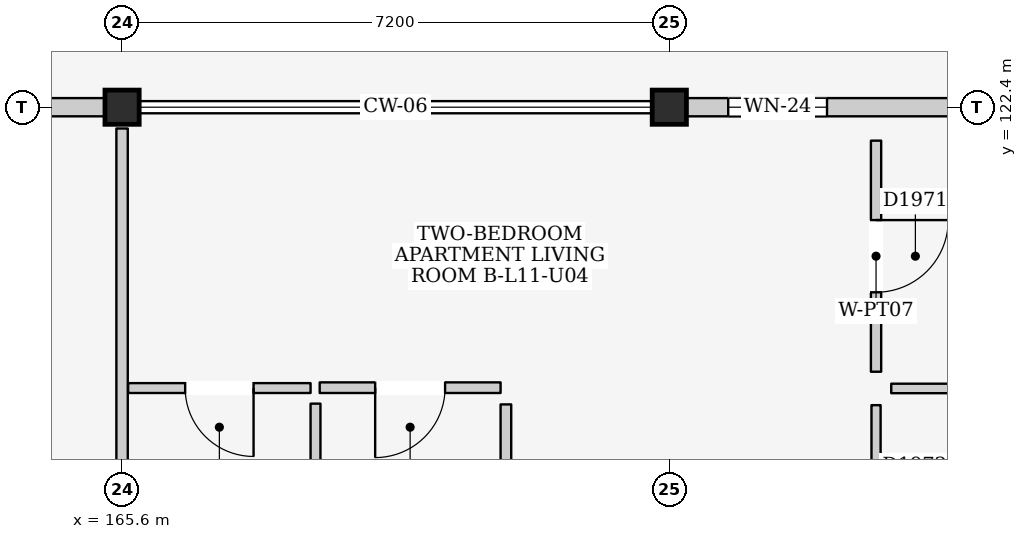
"""IFC4 building model, lengths in metres.
Left out: names, types, materials, properties, quantities, classifications, styles, units other than length and angle.
Written with IfcOpenShell. Run it as: python <this file> out.ifc"""

import sys

from ifc_helpers import new_model, si_unit, direction, frame, frame_2d, origin, origin_2d, place, context, subcontext, project, spatial, rectangle, extrude, element, fill, save


model = new_model("IFC4")
c1 = context("Model", 3, precision=1e-05, world=origin(), true_north=direction((0.0, 1.0)))
c2 = subcontext(c1, "Body", "Model", "MODEL_VIEW")
j1 = project(units=[si_unit("LENGTHUNIT", "METRE"), si_unit("PLANEANGLEUNIT", "RADIAN")], contexts=[c1])
p1 = place(None, origin())
s1 = spatial("IfcSite", under=j1, at=p1, CompositionType="ELEMENT")
p2 = place(p1, origin())
s2 = spatial("IfcBuilding", under=s1, at=p2, CompositionType="ELEMENT")
p3 = place(p2, frame((0.0, 0.0, 38.0)))
s3 = spatial("IfcBuildingStorey", under=s2, at=p3, CompositionType="ELEMENT", Elevation=38.0)
for number, where, z_axis, x_axis in (
    (1, (165.6, 122.4, 0.0), (0.0, 0.0, 1.0), (1.0, 0.0, 0.0)),
    (2, (172.8, 122.4, 0.0), (0.0, 0.0, 1.0), (1.0, 0.0, 0.0)),
):
    element("IfcColumn", number, at=place(p3, frame(where, z_axis=z_axis, x_axis=x_axis)), inside=s3, PredefinedType="COLUMN", context=c2, shape_type="SweptSolid", body=[
        extrude(rectangle(XDim=0.45, YDim=0.45, at=origin_2d()), origin(), (0.0, 0.0, 1.0), 3.2),
    ])
p4 = place(p3, frame((158.625, 122.4, 0.0), z_axis=(0.0, 0.0, 1.0), x_axis=(1.0, 0.0, 0.0)))
e3 = element("IfcWall", 3, at=p4, inside=s3, PredefinedType="ELEMENTEDWALL", context=c2, shape_type="SweptSolid", body=[
    extrude(rectangle(XDim=6.75, YDim=0.24, at=frame_2d((3.375, 0.0))), origin(), (0.0, 0.0, 1.0), 2.525),
])
p5 = place(p4, frame((3.85, 0.0, 0.0)))
e4 = element("IfcOpeningElement", 4, at=p5, cuts=e3, PredefinedType="OPENING", context=c2, shape_type="SweptSolid", body=[
    extrude(rectangle(XDim=2.0, YDim=2.12, at=frame_2d((1.0, 1.06))), frame((0.0, 0.135, 0.0), z_axis=(0.0, -1.0, 0.0), x_axis=(1.0, 0.0, 0.0)), (0.0, 0.0, 1.0), 0.27),
])
p6 = place(p4, frame((0.55, 0.0, 0.9)))
e5 = element("IfcOpeningElement", 5, at=p6, cuts=e3, PredefinedType="OPENING", context=c2, shape_type="SweptSolid", body=[
    extrude(rectangle(XDim=1.55, YDim=1.45, at=frame_2d((0.775, 0.725))), frame((0.0, 0.135, 0.0), z_axis=(0.0, -1.0, 0.0), x_axis=(1.0, 0.0, 0.0)), (0.0, 0.0, 1.0), 0.27),
])
p7 = place(p3, frame((173.025, 122.4, 0.0), z_axis=(0.0, 0.0, 1.0), x_axis=(1.0, 0.0, 0.0)))
e6 = element("IfcWall", 6, at=p7, inside=s3, PredefinedType="ELEMENTEDWALL", context=c2, shape_type="SweptSolid", body=[
    extrude(rectangle(XDim=6.75, YDim=0.24, at=frame_2d((3.375, 0.0))), origin(), (0.0, 0.0, 1.0), 2.525),
])
p8 = place(p7, frame((3.85, 0.0, 0.0)))
e7 = element("IfcOpeningElement", 7, at=p8, cuts=e6, PredefinedType="OPENING", context=c2, shape_type="SweptSolid", body=[
    extrude(rectangle(XDim=1.8, YDim=2.12, at=frame_2d((0.9, 1.06))), frame((0.0, 0.135, 0.0), z_axis=(0.0, -1.0, 0.0), x_axis=(1.0, 0.0, 0.0)), (0.0, 0.0, 1.0), 0.27),
])
p9 = place(p7, frame((0.55, 0.0, 0.9)))
e8 = element("IfcOpeningElement", 8, at=p9, cuts=e6, PredefinedType="OPENING", context=c2, shape_type="SweptSolid", body=[
    extrude(rectangle(XDim=1.3, YDim=1.25, at=frame_2d((0.65, 0.625))), frame((0.0, 0.135, 0.0), z_axis=(0.0, -1.0, 0.0), x_axis=(1.0, 0.0, 0.0)), (0.0, 0.0, 1.0), 0.27),
])
p10 = place(p3, frame((165.6, 115.48, 0.0), z_axis=(0.0, 0.0, 1.0), x_axis=(0.0, 1.0, 0.0)))
e9 = element("IfcWall", 9, at=p10, inside=s3, PredefinedType="PARTITIONING", context=c2, shape_type="SweptSolid", body=[
    extrude(rectangle(XDim=6.64, YDim=0.15, at=frame_2d((3.32, 0.0))), origin(), (0.0, 0.0, 1.0), 2.475),
])
p11 = place(p3, frame((165.68, 118.705, 0.0), z_axis=(0.0, 0.0, 1.0), x_axis=(1.0, 0.0, 0.0)))
e10 = element("IfcWall", 10, at=p11, inside=s3, PredefinedType="PARTITIONING", context=c2, shape_type="SweptSolid", body=[
    extrude(rectangle(XDim=2.4, YDim=0.13, at=frame_2d((1.2, 0.0))), origin(), (0.0, 0.0, 1.0), 2.99),
])
p12 = place(p11, frame((0.75, 0.0, 0.0)))
e11 = element("IfcOpeningElement", 11, at=p12, cuts=e10, PredefinedType="OPENING", context=c2, shape_type="SweptSolid", body=[
    extrude(rectangle(XDim=0.9, YDim=2.1, at=frame_2d((0.45, 1.05))), frame((0.0, 0.08, 0.0), z_axis=(0.0, -1.0, 0.0), x_axis=(1.0, 0.0, 0.0)), (0.0, 0.0, 1.0), 0.16),
])
p13 = place(p3, frame((168.145, 115.46, 0.0), z_axis=(0.0, 0.0, 1.0), x_axis=(0.0, 1.0, 0.0)))
e12 = element("IfcWall", 12, at=p13, inside=s3, PredefinedType="PARTITIONING", context=c2, shape_type="SweptSolid", body=[
    extrude(rectangle(XDim=3.04, YDim=0.13, at=frame_2d((1.52, 0.0))), origin(), (0.0, 0.0, 1.0), 2.99),
])
p14 = place(p3, frame((168.2, 118.71, 0.0), z_axis=(0.0, 0.0, 1.0), x_axis=(1.0, 0.0, 0.0)))
e13 = element("IfcWall", 13, at=p14, inside=s3, PredefinedType="PARTITIONING", context=c2, shape_type="SweptSolid", body=[
    extrude(rectangle(XDim=2.38, YDim=0.14, at=frame_2d((1.19, 0.0))), origin(), (0.0, 0.0, 1.0), 2.99),
])
p15 = place(p14, frame((0.73, 0.0, 0.0)))
e14 = element("IfcOpeningElement", 14, at=p15, cuts=e13, PredefinedType="OPENING", context=c2, shape_type="SweptSolid", body=[
    extrude(rectangle(XDim=0.92, YDim=2.1, at=frame_2d((0.46, 1.05))), frame((0.0, 0.085, 0.0), z_axis=(0.0, -1.0, 0.0), x_axis=(1.0, 0.0, 0.0)), (0.0, 0.0, 1.0), 0.17),
])
p16 = place(p3, frame((170.65, 115.43, 0.0), z_axis=(0.0, 0.0, 1.0), x_axis=(0.0, 1.0, 0.0)))
e15 = element("IfcWall", 15, at=p16, inside=s3, PredefinedType="PARTITIONING", context=c2, shape_type="SweptSolid", body=[
    extrude(rectangle(XDim=3.06, YDim=0.14, at=frame_2d((1.53, 0.0))), origin(), (0.0, 0.0, 1.0), 2.99),
])
p17 = place(p3, frame((175.52, 118.92, 0.0), z_axis=(0.0, 0.0, 1.0), x_axis=(0.0, 1.0, 0.0)))
e16 = element("IfcWall", 16, at=p17, inside=s3, PredefinedType="PARTITIONING", context=c2, shape_type="SweptSolid", body=[
    extrude(rectangle(XDim=3.04, YDim=0.135, at=frame_2d((1.52, 0.0))), origin(), (0.0, 0.0, 1.0), 2.99),
])
p18 = place(p17, frame((1.045, 0.0, 0.0)))
e17 = element("IfcOpeningElement", 17, at=p18, cuts=e16, PredefinedType="OPENING", context=c2, shape_type="SweptSolid", body=[
    extrude(rectangle(XDim=0.95, YDim=2.15, at=frame_2d((0.475, 1.075))), frame((0.0, 0.083, 0.0), z_axis=(0.0, -1.0, 0.0), x_axis=(1.0, 0.0, 0.0)), (0.0, 0.0, 1.0), 0.165),
])
p19 = place(p3, frame((175.72, 118.7, 0.0), z_axis=(0.0, 0.0, 1.0), x_axis=(1.0, 0.0, 0.0)))
e18 = element("IfcWall", 18, at=p19, inside=s3, PredefinedType="PARTITIONING", context=c2, shape_type="SweptSolid", body=[
    extrude(rectangle(XDim=4.06, YDim=0.125, at=frame_2d((2.03, 0.0))), origin(), (0.0, 0.0, 1.0), 2.99),
])
p20 = place(p3, frame((175.52, 115.44, 0.0), z_axis=(0.0, 0.0, 1.0), x_axis=(0.0, 1.0, 0.0)))
e19 = element("IfcWall", 19, at=p20, inside=s3, PredefinedType="PARTITIONING", context=c2, shape_type="SweptSolid", body=[
    extrude(rectangle(XDim=3.04, YDim=0.12, at=frame_2d((1.52, 0.0))), origin(), (0.0, 0.0, 1.0), 2.99),
])
p21 = place(p20, frame((1.04, 0.0, 0.0)))
e20 = element("IfcOpeningElement", 20, at=p21, cuts=e19, PredefinedType="OPENING", context=c2, shape_type="SweptSolid", body=[
    extrude(rectangle(XDim=0.96, YDim=2.15, at=frame_2d((0.48, 1.075))), frame((0.0, 0.075, 0.0), z_axis=(0.0, -1.0, 0.0), x_axis=(1.0, 0.0, 0.0)), (0.0, 0.0, 1.0), 0.15),
])
p22 = place(p9, origin())
e21 = element("IfcWindow", 21, at=p22, inside=s3, PartitioningType="SINGLE_PANEL", PredefinedType="WINDOW", context=c2, shape_type="SweptSolid", body=[
    extrude(rectangle(XDim=1.3, YDim=1.25, at=frame_2d((0.65, 0.625))), frame((0.0, 0.03, 0.0), z_axis=(0.0, -1.0, 0.0), x_axis=(1.0, 0.0, 0.0)), (0.0, 0.0, 1.0), 0.06),
])
fill(e8, e21)
p23 = place(p12, frame((0.9, 0.0, 0.0), z_axis=(0.0, 0.0, 1.0), x_axis=(-1.0, 0.0, 0.0)))
e22 = element("IfcDoor", 22, at=p23, inside=s3, OperationType="SINGLE_SWING_LEFT", PredefinedType="DOOR", context=c2, shape_type="SweptSolid", body=[
    extrude(rectangle(XDim=0.9, YDim=2.1, at=frame_2d((0.45, 1.05))), frame((0.0, 0.025, 0.0), z_axis=(0.0, -1.0, 0.0), x_axis=(1.0, 0.0, 0.0)), (0.0, 0.0, 1.0), 0.05),
])
fill(e11, e22)
p24 = place(p15, frame((0.92, 0.0, 0.0), z_axis=(0.0, 0.0, 1.0), x_axis=(-1.0, 0.0, 0.0)))
e23 = element("IfcDoor", 23, at=p24, inside=s3, OperationType="SINGLE_SWING_RIGHT", PredefinedType="DOOR", context=c2, shape_type="SweptSolid", body=[
    extrude(rectangle(XDim=0.92, YDim=2.1, at=frame_2d((0.46, 1.05))), frame((0.0, 0.025, 0.0), z_axis=(0.0, -1.0, 0.0), x_axis=(1.0, 0.0, 0.0)), (0.0, 0.0, 1.0), 0.05),
])
fill(e14, e23)
p25 = place(p18, frame((0.95, 0.0, 0.0), z_axis=(0.0, 0.0, 1.0), x_axis=(-1.0, 0.0, 0.0)))
e24 = element("IfcDoor", 24, at=p25, inside=s3, OperationType="SINGLE_SWING_LEFT", PredefinedType="DOOR", context=c2, shape_type="SweptSolid", body=[
    extrude(rectangle(XDim=0.95, YDim=2.15, at=frame_2d((0.475, 1.075))), frame((0.0, 0.025, 0.0), z_axis=(0.0, -1.0, 0.0), x_axis=(1.0, 0.0, 0.0)), (0.0, 0.0, 1.0), 0.05),
])
fill(e17, e24)
save(model, sys.argv[1])
